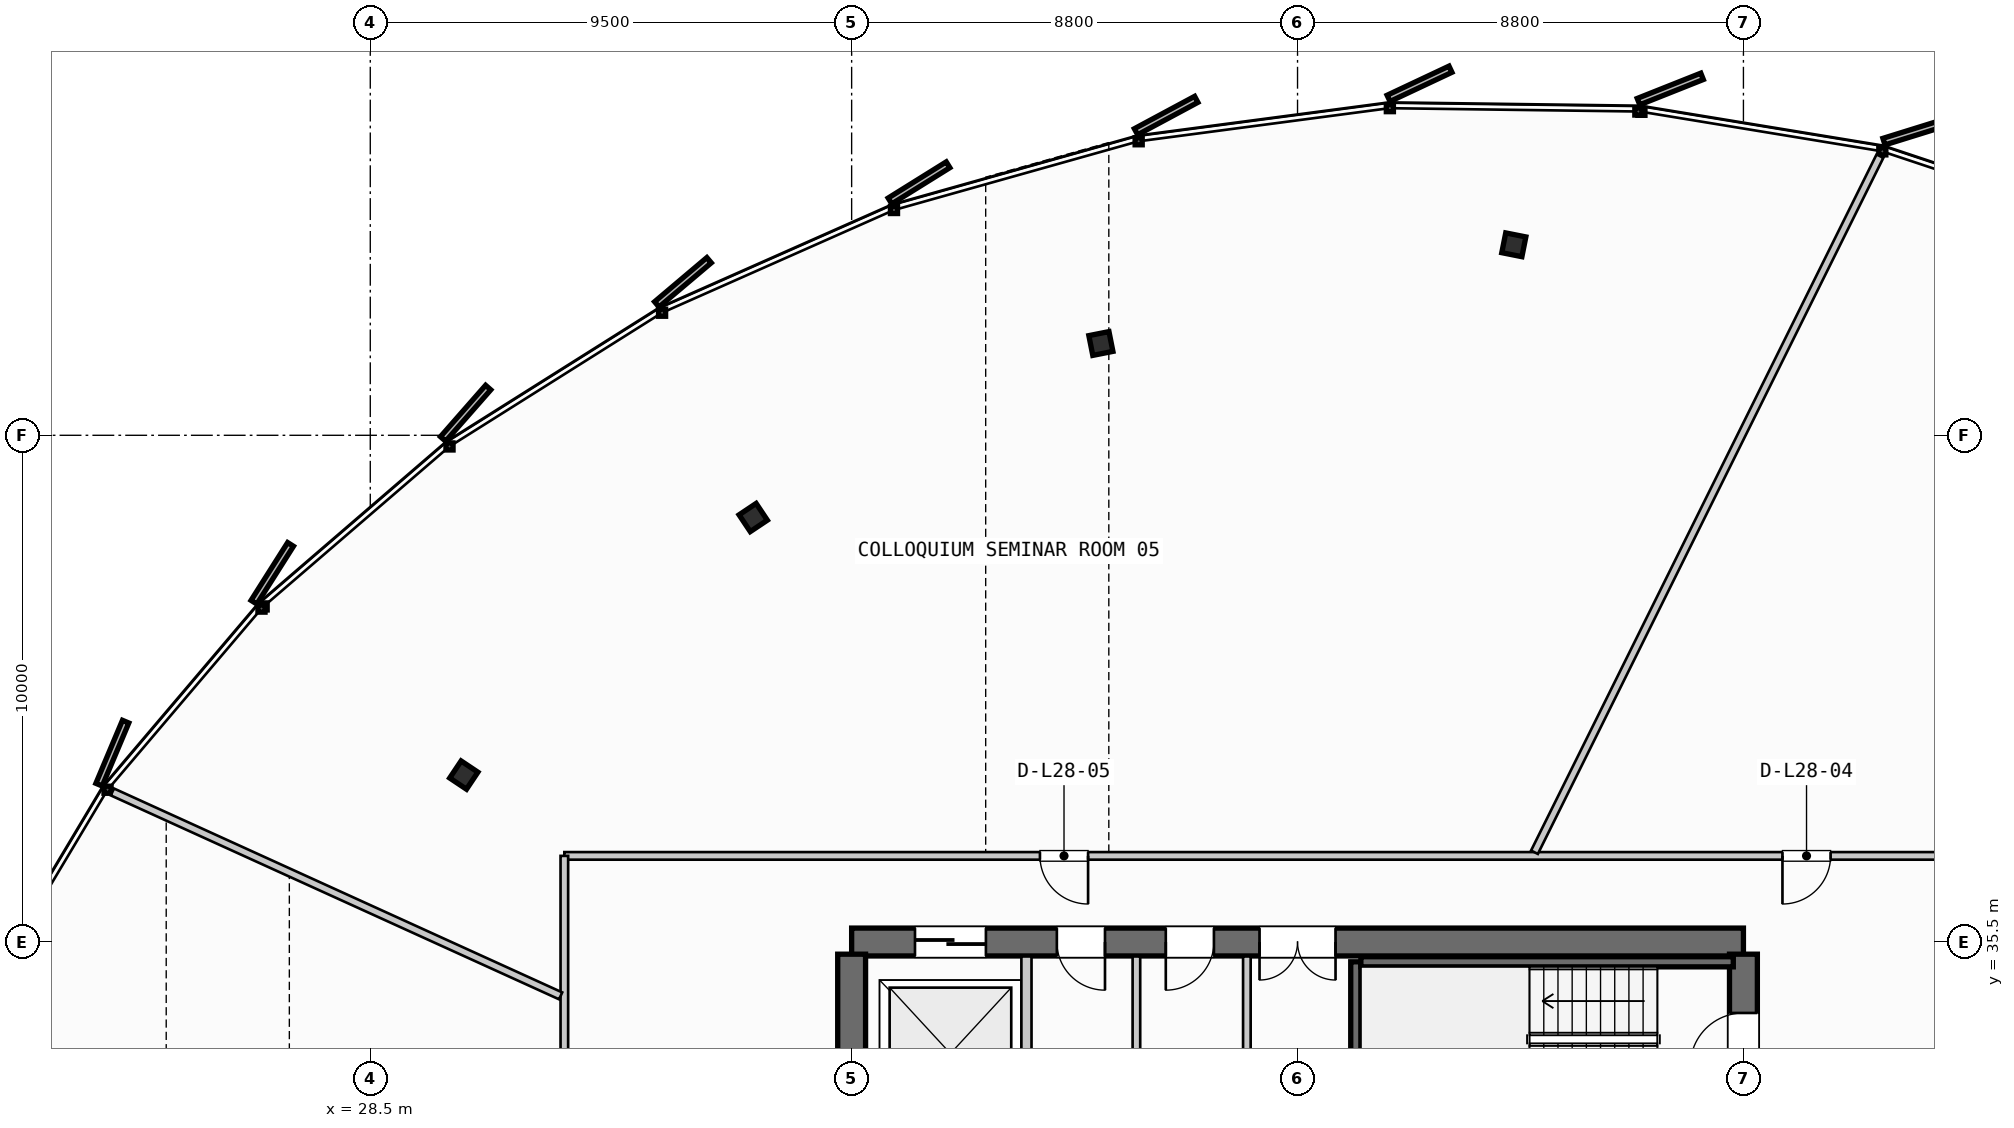
"""IFC4 building model, lengths in metres.
Left out: names, types, materials, properties, quantities, classifications, styles, units other than length and angle.
Written with IfcOpenShell. Run it as: python <this file> out.ifc"""

import sys

from ifc_helpers import new_model, si_unit, direction, frame, frame_2d, origin, origin_2d, place, context, subcontext, project, spatial, rectangle, i_section, extrude, source, transform, mapped, element, fill, save


model = new_model("IFC4")
c1 = context("Model", 3, precision=1e-05, world=origin(), true_north=direction((0.0, 1.0)))
c2 = subcontext(c1, "Body", "Model", "MODEL_VIEW")
j1 = project(units=[si_unit("LENGTHUNIT", "METRE"), si_unit("PLANEANGLEUNIT", "RADIAN")], contexts=[c1])
p1 = place(None, origin())
s1 = spatial("IfcSite", under=j1, at=p1, CompositionType="ELEMENT")
p2 = place(p1, origin())
s2 = spatial("IfcBuilding", under=s1, at=p2, CompositionType="ELEMENT")
p3 = place(p2, frame((0.0, 0.0, 114.4)))
s3 = spatial("IfcBuildingStorey", under=s2, at=p3, CompositionType="ELEMENT", Elevation=114.4)
p4 = place(p3, frame((55.6, 35.5, 0.0), z_axis=(0.0, 0.0, 1.0), x_axis=(-1.0, 0.0, 0.0)))
e1 = element("IfcWall", 1, at=p4, inside=s3, PredefinedType="SHEAR", context=c2, shape_type="SweptSolid", body=[
    extrude(rectangle(XDim=17.6, YDim=0.55, at=frame_2d((8.8, 0.0))), origin(), (0.0, 0.0, 1.0), 3.35),
])
p5 = place(p4, frame((8.05, 0.0, 0.0)))
e2 = element("IfcOpeningElement", 2, at=p5, cuts=e1, PredefinedType="OPENING", context=c2, shape_type="SweptSolid", body=[
    extrude(rectangle(XDim=1.5, YDim=2.2, at=frame_2d((0.75, 1.1))), frame((0.0, 0.285, 0.0), z_axis=(0.0, -1.0, 0.0), x_axis=(1.0, 0.0, 0.0)), (0.0, 0.0, 1.0), 0.57),
])
p6 = place(p4, frame((14.95, 0.0, 0.0)))
e3 = element("IfcOpeningElement", 3, at=p6, cuts=e1, PredefinedType="OPENING", context=c2, shape_type="SweptSolid", body=[
    extrude(rectangle(XDim=1.4, YDim=2.3, at=frame_2d((0.7, 1.15))), frame((0.0, 0.285, 0.0), z_axis=(0.0, -1.0, 0.0), x_axis=(1.0, 0.0, 0.0)), (0.0, 0.0, 1.0), 0.57),
])
p7 = place(p4, frame((12.6, 0.0, 0.0)))
e4 = element("IfcOpeningElement", 4, at=p7, cuts=e1, PredefinedType="OPENING", context=c2, shape_type="SweptSolid", body=[
    extrude(rectangle(XDim=0.95, YDim=2.15, at=frame_2d((0.475, 1.075))), frame((0.0, 0.285, 0.0), z_axis=(0.0, -1.0, 0.0), x_axis=(1.0, 0.0, 0.0)), (0.0, 0.0, 1.0), 0.57),
])
p8 = place(p4, frame((10.45, 0.0, 0.0)))
e5 = element("IfcOpeningElement", 5, at=p8, cuts=e1, PredefinedType="OPENING", context=c2, shape_type="SweptSolid", body=[
    extrude(rectangle(XDim=0.95, YDim=2.15, at=frame_2d((0.475, 1.075))), frame((0.0, 0.285, 0.0), z_axis=(0.0, -1.0, 0.0), x_axis=(1.0, 0.0, 0.0)), (0.0, 0.0, 1.0), 0.57),
])
p9 = place(p3, frame((38.0, 35.26, 0.0), z_axis=(0.0, 0.0, 1.0), x_axis=(0.0, -1.0, 0.0)))
e6 = element("IfcWall", 6, at=p9, inside=s3, PredefinedType="SHEAR", context=c2, shape_type="SweptSolid", body=[
    extrude(rectangle(XDim=14.92, YDim=0.55, at=frame_2d((7.46, 0.0))), origin(), (0.0, 0.0, 1.0), 3.35),
])
p10 = place(p9, frame((5.21, 0.0, 0.0)))
e7 = element("IfcOpeningElement", 7, at=p10, cuts=e6, PredefinedType="OPENING", context=c2, shape_type="SweptSolid", body=[
    extrude(rectangle(XDim=1.1, YDim=2.2, at=frame_2d((0.55, 1.1))), frame((0.0, 0.285, 0.0), z_axis=(0.0, -1.0, 0.0), x_axis=(1.0, 0.0, 0.0)), (0.0, 0.0, 1.0), 0.57),
])
p11 = place(p3, frame((55.6, 20.34, 0.0), z_axis=(0.0, 0.0, 1.0), x_axis=(0.0, 1.0, 0.0)))
e8 = element("IfcWall", 8, at=p11, inside=s3, PredefinedType="SHEAR", context=c2, shape_type="SweptSolid", body=[
    extrude(rectangle(XDim=14.92, YDim=0.55, at=frame_2d((7.46, 0.0))), origin(), (0.0, 0.0, 1.0), 3.35),
])
p12 = place(p11, frame((12.71, 0.0, 0.0)))
e9 = element("IfcOpeningElement", 9, at=p12, cuts=e8, PredefinedType="OPENING", context=c2, shape_type="SweptSolid", body=[
    extrude(rectangle(XDim=1.05, YDim=2.15, at=frame_2d((0.525, 1.075))), frame((0.0, 0.285, 0.0), z_axis=(0.0, -1.0, 0.0), x_axis=(1.0, 0.0, 0.0)), (0.0, 0.0, 1.0), 0.57),
])
p13 = place(p11, frame((8.61, 0.0, 0.0)))
e10 = element("IfcOpeningElement", 10, at=p13, cuts=e8, PredefinedType="OPENING", context=c2, shape_type="SweptSolid", body=[
    extrude(rectangle(XDim=1.1, YDim=2.2, at=frame_2d((0.55, 1.1))), frame((0.0, 0.285, 0.0), z_axis=(0.0, -1.0, 0.0), x_axis=(1.0, 0.0, 0.0)), (0.0, 0.0, 1.0), 0.57),
])
m1 = source(origin(), c2, "Body", "SweptSolid", [
    extrude(i_section(OverallWidth=0.405, OverallDepth=0.398, WebThickness=0.035, FlangeThickness=0.056, FilletRadius=0.015, at=origin_2d()), origin(), (0.0, 0.0, 1.0), 3.35),
])
for number, where, z_axis, x_axis in (
    (11, (51.069, 49.259, 0.0), (0.0, 0.0, 1.0), (0.195, 0.981, 0.0)),
    (12, (42.919, 47.311, 0.0), (0.0, 0.0, 1.0), (-0.195, 0.981, 0.0)),
    (13, (36.058, 43.877, 0.0), (0.0, 0.0, 1.0), (-0.556, 0.831, 0.0)),
    (14, (30.346, 38.794, 0.0), (0.0, 0.0, 1.0), (-0.831, 0.556, 0.0)),
):
    element("IfcColumn", number, at=place(p3, frame(where, z_axis=z_axis, x_axis=x_axis)), inside=s3, PredefinedType="COLUMN", context=c2, shape_type="MappedRepresentation", body=[
        mapped(m1, transform((0.0, 0.0, 0.0), scale=1.0)),
    ])
p14 = place(p3, frame((47.95, 32.05, 0.0), z_axis=(0.0, 0.0, 1.0), x_axis=(0.0, 1.0, 0.0)))
e15 = element("IfcWall", 15, at=p14, inside=s3, PredefinedType="SHEAR", context=c2, shape_type="SweptSolid", body=[
    extrude(rectangle(XDim=3.06, YDim=0.2, at=frame_2d((1.53, 0.0))), origin(), (0.0, 0.0, 1.0), 3.35),
])
p15 = place(p3, frame((48.05, 35.11, 0.0), z_axis=(0.0, 0.0, 1.0), x_axis=(1.0, 0.0, 0.0)))
e16 = element("IfcWall", 16, at=p15, inside=s3, PredefinedType="SHEAR", context=c2, shape_type="SweptSolid", body=[
    extrude(rectangle(XDim=7.35, YDim=0.2, at=frame_2d((3.675, 0.0))), origin(), (0.0, 0.0, 1.0), 3.35),
])
p16 = place(p3, frame((41.45, 31.85, 0.0), z_axis=(0.0, 0.0, 1.0), x_axis=(0.0, 1.0, 0.0)))
e17 = element("IfcWall", 17, at=p16, inside=s3, PredefinedType="PARTITIONING", context=c2, shape_type="SweptSolid", body=[
    extrude(rectangle(XDim=3.365, YDim=0.2, at=frame_2d((1.683, 0.0))), origin(), (0.0, 0.0, 1.0), 2.28),
])
p17 = place(p3, frame((45.8, 31.85, 0.0), z_axis=(0.0, 0.0, 1.0), x_axis=(0.0, 1.0, 0.0)))
e18 = element("IfcWall", 18, at=p17, inside=s3, PredefinedType="PARTITIONING", context=c2, shape_type="SweptSolid", body=[
    extrude(rectangle(XDim=3.365, YDim=0.15, at=frame_2d((1.683, 0.0))), origin(), (0.0, 0.0, 1.0), 2.28),
])
p18 = place(p3, frame((43.62, 31.85, 0.0), z_axis=(0.0, 0.0, 1.0), x_axis=(0.0, 1.0, 0.0)))
e19 = element("IfcWall", 19, at=p18, inside=s3, PredefinedType="PLUMBINGWALL", context=c2, shape_type="SweptSolid", body=[
    extrude(rectangle(XDim=3.365, YDim=0.15, at=frame_2d((1.683, 0.0))), origin(), (0.0, 0.0, 1.0), 2.28),
])
p19 = place(p3, frame((62.83, 37.2, 0.0), z_axis=(0.0, 0.0, 1.0), x_axis=(-1.0, 0.0, 0.0)))
e20 = element("IfcWall", 20, at=p19, inside=s3, PredefinedType="PARTITIONING", context=c2, shape_type="SweptSolid", body=[
    extrude(rectangle(XDim=30.5, YDim=0.15, at=frame_2d((15.25, 0.0))), origin(), (0.0, 0.0, 1.0), 2.28),
])
p20 = place(p19, frame((5.51, 0.0, 0.0)))
e21 = element("IfcOpeningElement", 21, at=p20, cuts=e20, PredefinedType="OPENING", context=c2, shape_type="SweptSolid", body=[
    extrude(rectangle(XDim=0.95, YDim=2.15, at=frame_2d((0.475, 1.075))), frame((0.0, 0.085, 0.0), z_axis=(0.0, -1.0, 0.0), x_axis=(1.0, 0.0, 0.0)), (0.0, 0.0, 1.0), 0.17),
])
p21 = place(p19, frame((20.164, 0.0, 0.0)))
e22 = element("IfcOpeningElement", 22, at=p21, cuts=e20, PredefinedType="OPENING", context=c2, shape_type="SweptSolid", body=[
    extrude(rectangle(XDim=0.95, YDim=2.15, at=frame_2d((0.475, 1.075))), frame((0.0, 0.085, 0.0), z_axis=(0.0, -1.0, 0.0), x_axis=(1.0, 0.0, 0.0)), (0.0, 0.0, 1.0), 0.17),
])
p22 = place(p3, frame((32.33, 37.2, 0.0), z_axis=(0.0, 0.0, 1.0), x_axis=(0.0, -1.0, 0.0)))
e23 = element("IfcWall", 23, at=p22, inside=s3, PredefinedType="PARTITIONING", context=c2, shape_type="SweptSolid", body=[
    extrude(rectangle(XDim=19.22, YDim=0.15, at=frame_2d((9.61, 0.0))), origin(), (0.0, 0.0, 1.0), 2.28),
])
p23 = place(p22, frame((10.229, 0.0, 0.0)))
e24 = element("IfcOpeningElement", 24, at=p23, cuts=e23, PredefinedType="OPENING", context=c2, shape_type="SweptSolid", body=[
    extrude(rectangle(XDim=0.95, YDim=2.15, at=frame_2d((0.475, 1.075))), frame((0.0, 0.085, 0.0), z_axis=(0.0, -1.0, 0.0), x_axis=(1.0, 0.0, 0.0)), (0.0, 0.0, 1.0), 0.17),
])
p24 = place(p3, frame((51.476, 37.272, 0.0), z_axis=(0.0, 0.0, 1.0), x_axis=(0.444600978951, 0.895728736569, 0.0)))
e25 = element("IfcWall", 25, at=p24, inside=s3, PredefinedType="PARTITIONING", context=c2, shape_type="SweptSolid", body=[
    extrude(rectangle(XDim=15.336, YDim=0.15, at=frame_2d((7.668, 0.0))), origin(), (0.0, 0.0, 1.0), 2.28),
])
p25 = place(p3, frame((32.257, 34.438, 0.0), z_axis=(0.0, 0.0, 1.0), x_axis=(-0.910252025758, 0.414054645672, 0.0)))
e26 = element("IfcWall", 26, at=p25, inside=s3, PredefinedType="PARTITIONING", context=c2, shape_type="SweptSolid", body=[
    extrude(rectangle(XDim=9.719, YDim=0.15, at=frame_2d((4.859, 0.0))), origin(), (0.0, 0.0, 1.0), 2.28),
])
m2 = source(origin(), c2, "Body", "SweptSolid", [
    extrude(rectangle(XDim=1.05, YDim=2.15, at=frame_2d((0.525, 1.075))), frame((0.0, 0.025, 0.0), z_axis=(0.0, -1.0, 0.0), x_axis=(1.0, 0.0, 0.0)), (0.0, 0.0, 1.0), 0.05),
])
p26 = place(p12, origin())
e27 = element("IfcDoor", 27, at=p26, inside=s3, OperationType="SINGLE_SWING_LEFT", PredefinedType="DOOR", context=c2, shape_type="MappedRepresentation", body=[
    mapped(m2, transform((0.0, 0.0, 0.0), scale=1.0)),
])
fill(e9, e27)
m3 = source(origin(), c2, "Body", "SweptSolid", [
    extrude(rectangle(XDim=1.5, YDim=2.2, at=frame_2d((0.75, 1.1))), frame((0.0, 0.025, 0.0), z_axis=(0.0, -1.0, 0.0), x_axis=(1.0, 0.0, 0.0)), (0.0, 0.0, 1.0), 0.05),
])
p27 = place(p5, origin())
e28 = element("IfcDoor", 28, at=p27, inside=s3, OperationType="DOUBLE_DOOR_SINGLE_SWING", PredefinedType="DOOR", context=c2, shape_type="MappedRepresentation", body=[
    mapped(m3, transform((0.0, 0.0, 0.0), scale=1.0)),
])
fill(e2, e28)
m4 = source(origin(), c2, "Body", "SweptSolid", [
    extrude(rectangle(XDim=1.4, YDim=2.3, at=frame_2d((0.7, 1.15))), frame((0.0, 0.025, 0.0), z_axis=(0.0, -1.0, 0.0), x_axis=(1.0, 0.0, 0.0)), (0.0, 0.0, 1.0), 0.05),
])
p28 = place(p6, origin())
e29 = element("IfcDoor", 29, at=p28, inside=s3, OperationType="SLIDING_TO_RIGHT", PredefinedType="DOOR", context=c2, shape_type="MappedRepresentation", body=[
    mapped(m4, transform((0.0, 0.0, 0.0), scale=1.0)),
])
fill(e3, e29)
m5 = source(origin(), c2, "Body", "SweptSolid", [
    extrude(rectangle(XDim=0.95, YDim=2.15, at=frame_2d((0.475, 1.075))), frame((0.0, 0.025, 0.0), z_axis=(0.0, -1.0, 0.0), x_axis=(1.0, 0.0, 0.0)), (0.0, 0.0, 1.0), 0.05),
])
p29 = place(p7, origin())
e30 = element("IfcDoor", 30, at=p29, inside=s3, OperationType="SINGLE_SWING_LEFT", PredefinedType="DOOR", context=c2, shape_type="MappedRepresentation", body=[
    mapped(m5, transform((0.0, 0.0, 0.0), scale=1.0)),
])
fill(e4, e30)
p30 = place(p8, origin())
e31 = element("IfcDoor", 31, at=p30, inside=s3, OperationType="SINGLE_SWING_RIGHT", PredefinedType="DOOR", context=c2, shape_type="MappedRepresentation", body=[
    mapped(m5, transform((0.0, 0.0, 0.0), scale=1.0)),
])
fill(e5, e31)
p31 = place(p20, origin())
e32 = element("IfcDoor", 32, at=p31, inside=s3, OperationType="SINGLE_SWING_RIGHT", PredefinedType="DOOR", context=c2, shape_type="MappedRepresentation", body=[
    mapped(m5, transform((0.0, 0.0, 0.0), scale=1.0)),
])
fill(e21, e32)
p32 = place(p21, origin())
e33 = element("IfcDoor", 33, at=p32, inside=s3, OperationType="SINGLE_SWING_LEFT", PredefinedType="DOOR", context=c2, shape_type="MappedRepresentation", body=[
    mapped(m5, transform((0.0, 0.0, 0.0), scale=1.0)),
])
fill(e22, e33)
save(model, sys.argv[1])
